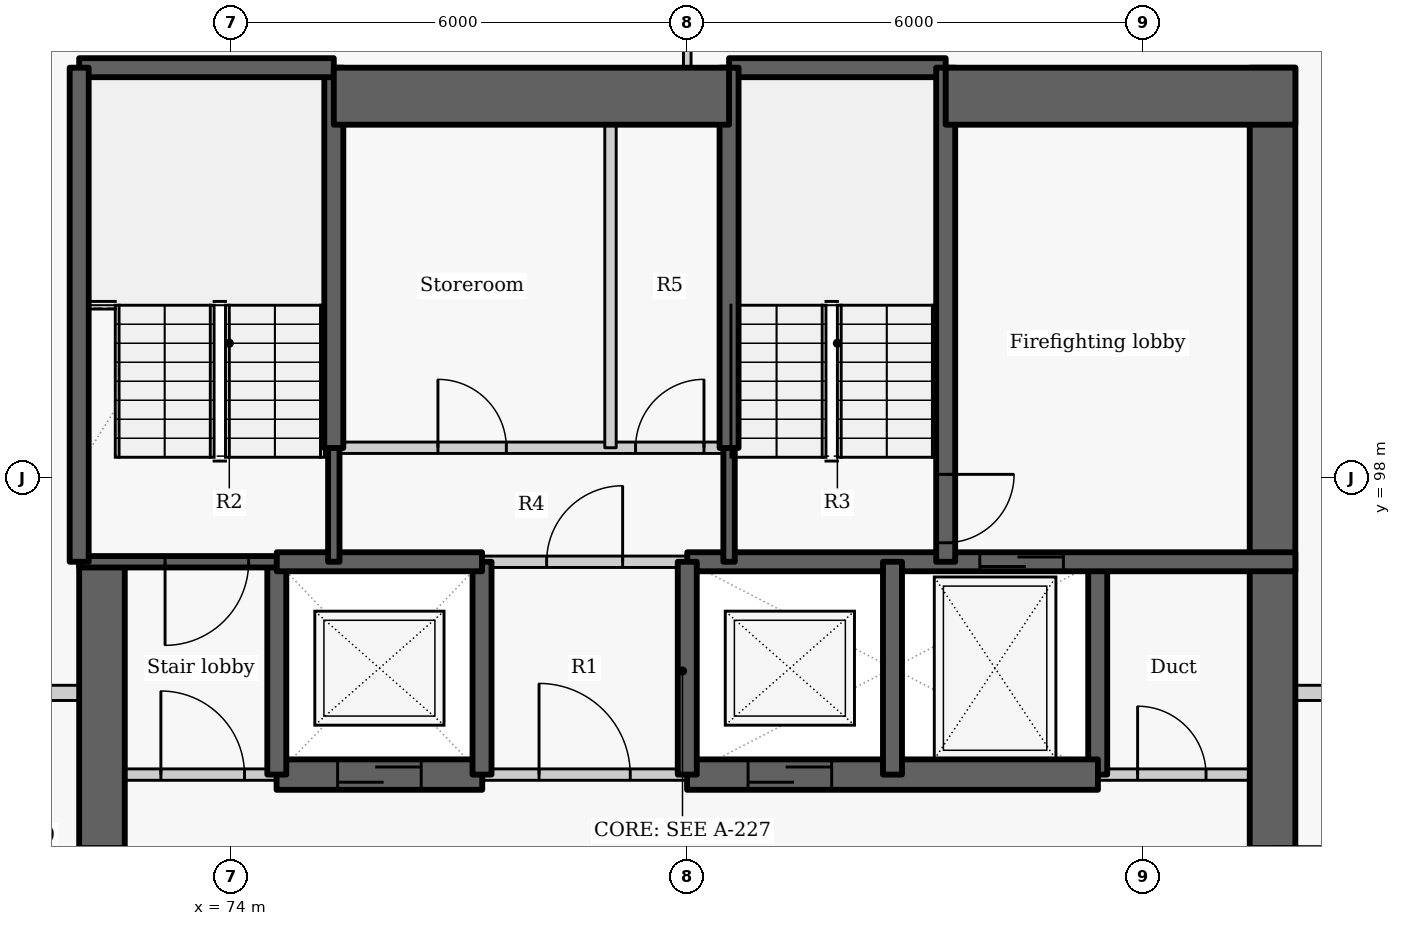
"""IFC4 building model, lengths in metres.
Left out: names, types, materials, properties, quantities, classifications, styles, units other than length and angle.
Written with IfcOpenShell. Run it as: python <this file> out.ifc"""

import sys

from ifc_helpers import new_model, si_unit, direction, frame, frame_2d, origin, place, context, subcontext, project, spatial, rectangle, extrude, element, fill, save


model = new_model("IFC4")
c1 = context("Model", 3, precision=1e-05, world=origin(), true_north=direction((0.0, 1.0)))
c2 = subcontext(c1, "Body", "Model", "MODEL_VIEW")
j1 = project(units=[si_unit("LENGTHUNIT", "METRE"), si_unit("PLANEANGLEUNIT", "RADIAN")], contexts=[c1])
p1 = place(None, origin())
s1 = spatial("IfcSite", under=j1, at=p1, CompositionType="ELEMENT")
p2 = place(p1, origin())
s2 = spatial("IfcBuilding", under=s1, at=p2, CompositionType="ELEMENT")
p3 = place(p2, frame((0.0, 0.0, 150.3)))
s3 = spatial("IfcBuildingStorey", under=s2, at=p3, CompositionType="ELEMENT", Elevation=150.3)
p4 = place(p3, frame((72.3, 87.8, -0.275), z_axis=(0.0, 0.0, 1.0), x_axis=(0.0, 1.0, 0.0)))
e1 = element("IfcWall", 1, at=p4, inside=s3, PredefinedType="SHEAR", context=c2, shape_type="SweptSolid", body=[
    extrude(rectangle(XDim=9.1, YDim=0.6, at=frame_2d((4.55, 0.0))), origin(), (0.0, 0.0, 1.0), 3.3),
])
p5 = place(p4, frame((3.852, 0.0, 0.275)))
e2 = element("IfcOpeningElement", 2, at=p5, cuts=e1, PredefinedType="OPENING", context=c2, shape_type="SweptSolid", body=[
    extrude(rectangle(XDim=1.5, YDim=2.1, at=frame_2d((0.75, 1.05))), frame((0.0, 0.31, 0.0), z_axis=(0.0, -1.0, 0.0), x_axis=(1.0, 0.0, 0.0)), (0.0, 0.0, 1.0), 0.62),
])
p6 = place(p3, frame((85.4, 94.1, -0.275), z_axis=(0.0, 0.0, 1.0), x_axis=(0.0, 1.0, 0.0)))
e3 = element("IfcWall", 3, at=p6, inside=s3, PredefinedType="SHEAR", context=c2, shape_type="SweptSolid", body=[
    extrude(rectangle(XDim=2.8, YDim=0.25, at=frame_2d((1.4, 0.0))), origin(), (0.0, 0.0, 1.0), 3.3),
])
p7 = place(p3, frame((87.7, 103.4, -0.275), z_axis=(0.0, 0.0, 1.0), x_axis=(0.0, -1.0, 0.0)))
e4 = element("IfcWall", 4, at=p7, inside=s3, PredefinedType="SHEAR", context=c2, shape_type="SweptSolid", body=[
    extrude(rectangle(XDim=15.6, YDim=0.6, at=frame_2d((7.8, 0.0))), origin(), (0.0, 0.0, 1.0), 3.3),
])
p8 = place(p7, frame((10.248, 0.0, 0.275)))
e5 = element("IfcOpeningElement", 5, at=p8, cuts=e4, PredefinedType="OPENING", context=c2, shape_type="SweptSolid", body=[
    extrude(rectangle(XDim=1.5, YDim=2.1, at=frame_2d((0.75, 1.05))), frame((0.0, 0.31, 0.0), z_axis=(0.0, -1.0, 0.0), x_axis=(1.0, 0.0, 0.0)), (0.0, 0.0, 1.0), 0.62),
])
p9 = place(p3, frame((72.0, 94.1, 0.0), z_axis=(0.0, 0.0, 1.0), x_axis=(1.0, 0.0, 0.0)))
e6 = element("IfcWall", 6, at=p9, inside=s3, PredefinedType="PARTITIONING", context=c2, shape_type="SweptSolid", body=[
    extrude(rectangle(XDim=2.603, YDim=0.15, at=frame_2d((1.302, 0.0))), origin(), (0.0, 0.0, 1.0), 3.025),
])
p10 = place(p9, frame((1.075, 0.0, 0.0)))
e7 = element("IfcOpeningElement", 7, at=p10, cuts=e6, PredefinedType="OPENING", context=c2, shape_type="SweptSolid", body=[
    extrude(rectangle(XDim=1.1, YDim=2.1, at=frame_2d((0.55, 1.05))), frame((0.0, 0.085, 0.0), z_axis=(0.0, -1.0, 0.0), x_axis=(1.0, 0.0, 0.0)), (0.0, 0.0, 1.0), 0.17),
])
p11 = place(p3, frame((77.297, 94.1, 0.0), z_axis=(0.0, 0.0, 1.0), x_axis=(1.0, 0.0, 0.0)))
e8 = element("IfcWall", 8, at=p11, inside=s3, PredefinedType="PARTITIONING", context=c2, shape_type="SweptSolid", body=[
    extrude(rectangle(XDim=2.706, YDim=0.15, at=frame_2d((1.353, 0.0))), origin(), (0.0, 0.0, 1.0), 3.025),
])
p12 = place(p11, frame((0.753, 0.0, 0.0)))
e9 = element("IfcOpeningElement", 9, at=p12, cuts=e8, PredefinedType="OPENING", context=c2, shape_type="SweptSolid", body=[
    extrude(rectangle(XDim=1.2, YDim=2.1, at=frame_2d((0.6, 1.05))), frame((0.0, 0.085, 0.0), z_axis=(0.0, -1.0, 0.0), x_axis=(1.0, 0.0, 0.0)), (0.0, 0.0, 1.0), 0.17),
])
p13 = place(p3, frame((85.397, 94.1, 0.0), z_axis=(0.0, 0.0, 1.0), x_axis=(1.0, 0.0, 0.0)))
e10 = element("IfcWall", 10, at=p13, inside=s3, PredefinedType="PARTITIONING", context=c2, shape_type="SweptSolid", body=[
    extrude(rectangle(XDim=2.603, YDim=0.15, at=frame_2d((1.302, 0.0))), origin(), (0.0, 0.0, 1.0), 3.025),
])
p14 = place(p13, frame((0.528, 0.0, 0.0)))
e11 = element("IfcOpeningElement", 11, at=p14, cuts=e10, PredefinedType="OPENING", context=c2, shape_type="SweptSolid", body=[
    extrude(rectangle(XDim=0.9, YDim=2.1, at=frame_2d((0.45, 1.05))), frame((0.0, 0.085, 0.0), z_axis=(0.0, -1.0, 0.0), x_axis=(1.0, 0.0, 0.0)), (0.0, 0.0, 1.0), 0.17),
])
p15 = place(p3, frame((74.597, 94.1, -0.275), z_axis=(0.0, 0.0, 1.0), x_axis=(1.0, 0.0, 0.0)))
e12 = element("IfcWall", 12, at=p15, inside=s3, PredefinedType="SHEAR", context=c2, shape_type="SweptSolid", body=[
    extrude(rectangle(XDim=2.706, YDim=0.4, at=frame_2d((1.353, 0.0))), origin(), (0.0, 0.0, 1.0), 3.3),
])
p16 = place(p15, frame((0.803, 0.0, 0.275)))
e13 = element("IfcOpeningElement", 13, at=p16, cuts=e12, PredefinedType="OPENING", context=c2, shape_type="SweptSolid", body=[
    extrude(rectangle(XDim=1.1, YDim=2.1, at=frame_2d((0.55, 1.05))), frame((0.0, 0.21, 0.0), z_axis=(0.0, -1.0, 0.0), x_axis=(1.0, 0.0, 0.0)), (0.0, 0.0, 1.0), 0.42),
])
p17 = place(p3, frame((79.997, 94.1, -0.275), z_axis=(0.0, 0.0, 1.0), x_axis=(1.0, 0.0, 0.0)))
e14 = element("IfcWall", 14, at=p17, inside=s3, PredefinedType="SHEAR", context=c2, shape_type="SweptSolid", body=[
    extrude(rectangle(XDim=5.406, YDim=0.4, at=frame_2d((2.703, 0.0))), origin(), (0.0, 0.0, 1.0), 3.3),
])
p18 = place(p17, frame((0.803, 0.0, 0.275)))
e15 = element("IfcOpeningElement", 15, at=p18, cuts=e14, PredefinedType="OPENING", context=c2, shape_type="SweptSolid", body=[
    extrude(rectangle(XDim=1.1, YDim=2.1, at=frame_2d((0.55, 1.05))), frame((0.0, 0.21, 0.0), z_axis=(0.0, -1.0, 0.0), x_axis=(1.0, 0.0, 0.0)), (0.0, 0.0, 1.0), 0.42),
])
p19 = place(p3, frame((74.6, 94.1, -0.275), z_axis=(0.0, 0.0, 1.0), x_axis=(0.0, 1.0, 0.0)))
e16 = element("IfcWall", 16, at=p19, inside=s3, PredefinedType="SHEAR", context=c2, shape_type="SweptSolid", body=[
    extrude(rectangle(XDim=2.8, YDim=0.25, at=frame_2d((1.4, 0.0))), origin(), (0.0, 0.0, 1.0), 3.3),
])
p20 = place(p3, frame((74.6, 96.9, -0.275), z_axis=(0.0, 0.0, 1.0), x_axis=(-1.0, 0.0, 0.0)))
e17 = element("IfcWall", 17, at=p20, inside=s3, PredefinedType="SHEAR", context=c2, shape_type="SweptSolid", body=[
    extrude(rectangle(XDim=2.6, YDim=0.15, at=frame_2d((1.3, 0.0))), origin(), (0.0, 0.0, 1.0), 3.3),
])
p21 = place(p20, frame((0.37, 0.0, 0.275)))
e18 = element("IfcOpeningElement", 18, at=p21, cuts=e17, PredefinedType="OPENING", context=c2, shape_type="SweptSolid", body=[
    extrude(rectangle(XDim=1.1, YDim=2.1, at=frame_2d((0.55, 1.05))), frame((0.0, 0.085, 0.0), z_axis=(0.0, -1.0, 0.0), x_axis=(1.0, 0.0, 0.0)), (0.0, 0.0, 1.0), 0.17),
])
p22 = place(p3, frame((77.3, 94.1, -0.275), z_axis=(0.0, 0.0, 1.0), x_axis=(0.0, 1.0, 0.0)))
e19 = element("IfcWall", 19, at=p22, inside=s3, PredefinedType="SHEAR", context=c2, shape_type="SweptSolid", body=[
    extrude(rectangle(XDim=2.8, YDim=0.25, at=frame_2d((1.4, 0.0))), origin(), (0.0, 0.0, 1.0), 3.3),
])
p23 = place(p3, frame((74.6, 96.9, -0.275), z_axis=(0.0, 0.0, 1.0), x_axis=(1.0, 0.0, 0.0)))
e20 = element("IfcWall", 20, at=p23, inside=s3, PredefinedType="SHEAR", context=c2, shape_type="SweptSolid", body=[
    extrude(rectangle(XDim=2.7, YDim=0.25, at=frame_2d((1.35, 0.0))), origin(), (0.0, 0.0, 1.0), 3.3),
])
p24 = place(p3, frame((80.0, 96.9, -0.275), z_axis=(0.0, 0.0, 1.0), x_axis=(1.0, 0.0, 0.0)))
e21 = element("IfcWall", 21, at=p24, inside=s3, PredefinedType="SHEAR", context=c2, shape_type="SweptSolid", body=[
    extrude(rectangle(XDim=8.0, YDim=0.25, at=frame_2d((4.0, 0.0))), origin(), (0.0, 0.0, 1.0), 3.3),
])
p25 = place(p24, frame((3.849, 0.0, 0.275)))
e22 = element("IfcOpeningElement", 22, at=p25, cuts=e21, PredefinedType="OPENING", context=c2, shape_type="SweptSolid", body=[
    extrude(rectangle(XDim=1.1, YDim=2.1, at=frame_2d((0.55, 1.05))), frame((0.0, 0.135, 0.0), z_axis=(0.0, -1.0, 0.0), x_axis=(1.0, 0.0, 0.0)), (0.0, 0.0, 1.0), 0.27),
])
p26 = place(p3, frame((80.0, 94.1, -0.275), z_axis=(0.0, 0.0, 1.0), x_axis=(0.0, 1.0, 0.0)))
e23 = element("IfcWall", 23, at=p26, inside=s3, PredefinedType="SHEAR", context=c2, shape_type="SweptSolid", body=[
    extrude(rectangle(XDim=2.8, YDim=0.25, at=frame_2d((1.4, 0.0))), origin(), (0.0, 0.0, 1.0), 3.3),
])
p27 = place(p3, frame((77.3, 96.9, 0.0), z_axis=(0.0, 0.0, 1.0), x_axis=(1.0, 0.0, 0.0)))
e24 = element("IfcWall", 24, at=p27, inside=s3, PredefinedType="PARTITIONING", context=c2, shape_type="SweptSolid", body=[
    extrude(rectangle(XDim=2.7, YDim=0.15, at=frame_2d((1.35, 0.0))), origin(), (0.0, 0.0, 1.0), 3.025),
])
p28 = place(p27, frame((0.85, 0.0, 0.0)))
e25 = element("IfcOpeningElement", 25, at=p28, cuts=e24, PredefinedType="OPENING", context=c2, shape_type="SweptSolid", body=[
    extrude(rectangle(XDim=1.0, YDim=2.1, at=frame_2d((0.5, 1.05))), frame((0.0, 0.085, 0.0), z_axis=(0.0, -1.0, 0.0), x_axis=(1.0, 0.0, 0.0)), (0.0, 0.0, 1.0), 0.17),
])
p29 = place(p3, frame((82.7, 94.1, -0.275), z_axis=(0.0, 0.0, 1.0), x_axis=(0.0, 1.0, 0.0)))
e26 = element("IfcWall", 26, at=p29, inside=s3, PredefinedType="SHEAR", context=c2, shape_type="SweptSolid", body=[
    extrude(rectangle(XDim=2.8, YDim=0.25, at=frame_2d((1.4, 0.0))), origin(), (0.0, 0.0, 1.0), 3.3),
])
p30 = place(p3, frame((75.35, 96.9, -0.275), z_axis=(0.0, 0.0, 1.0), x_axis=(0.0, 1.0, 0.0)))
e27 = element("IfcWall", 27, at=p30, inside=s3, PredefinedType="SHEAR", context=c2, shape_type="SweptSolid", body=[
    extrude(rectangle(XDim=1.503, YDim=0.15, at=frame_2d((0.751, 0.0))), origin(), (0.0, 0.0, 1.0), 3.3),
])
p31 = place(p3, frame((75.35, 98.397, -0.275), z_axis=(0.0, 0.0, 1.0), x_axis=(0.0, 1.0, 0.0)))
e28 = element("IfcWall", 28, at=p31, inside=s3, PredefinedType="SHEAR", context=c2, shape_type="SweptSolid", body=[
    extrude(rectangle(XDim=5.003, YDim=0.25, at=frame_2d((2.501, 0.0))), origin(), (0.0, 0.0, 1.0), 3.3),
])
p32 = place(p3, frame((72.0, 103.4, -0.275), z_axis=(0.0, 0.0, 1.0), x_axis=(1.0, 0.0, 0.0)))
e29 = element("IfcWall", 29, at=p32, inside=s3, PredefinedType="SHEAR", context=c2, shape_type="SweptSolid", body=[
    extrude(rectangle(XDim=3.35, YDim=0.25, at=frame_2d((1.675, 0.0))), origin(), (0.0, 0.0, 1.0), 3.3),
])
p33 = place(p3, frame((80.55, 103.4, -0.275), z_axis=(0.0, 0.0, 1.0), x_axis=(1.0, 0.0, 0.0)))
e30 = element("IfcWall", 30, at=p33, inside=s3, PredefinedType="SHEAR", context=c2, shape_type="SweptSolid", body=[
    extrude(rectangle(XDim=2.85, YDim=0.25, at=frame_2d((1.425, 0.0))), origin(), (0.0, 0.0, 1.0), 3.3),
])
p34 = place(p3, frame((72.0, 96.9, -0.275), z_axis=(0.0, 0.0, 1.0), x_axis=(0.0, 1.0, 0.0)))
e31 = element("IfcWall", 31, at=p34, inside=s3, PredefinedType="SHEAR", context=c2, shape_type="SweptSolid", body=[
    extrude(rectangle(XDim=6.5, YDim=0.25, at=frame_2d((3.25, 0.0))), origin(), (0.0, 0.0, 1.0), 3.3),
])
p35 = place(p3, frame((83.4, 103.4, -0.275), z_axis=(0.0, 0.0, 1.0), x_axis=(0.0, -1.0, 0.0)))
e32 = element("IfcWall", 32, at=p35, inside=s3, PredefinedType="SHEAR", context=c2, shape_type="SweptSolid", body=[
    extrude(rectangle(XDim=6.5, YDim=0.25, at=frame_2d((3.25, 0.0))), origin(), (0.0, 0.0, 1.0), 3.3),
])
p36 = place(p35, frame((5.35, 0.0, 0.275)))
e33 = element("IfcOpeningElement", 33, at=p36, cuts=e32, PredefinedType="OPENING", context=c2, shape_type="SweptSolid", body=[
    extrude(rectangle(XDim=0.9, YDim=2.1, at=frame_2d((0.45, 1.05))), frame((0.0, 0.135, 0.0), z_axis=(0.0, -1.0, 0.0), x_axis=(1.0, 0.0, 0.0)), (0.0, 0.0, 1.0), 0.27),
])
p37 = place(p3, frame((80.55, 96.9, -0.275), z_axis=(0.0, 0.0, 1.0), x_axis=(0.0, 1.0, 0.0)))
e34 = element("IfcWall", 34, at=p37, inside=s3, PredefinedType="SHEAR", context=c2, shape_type="SweptSolid", body=[
    extrude(rectangle(XDim=1.503, YDim=0.15, at=frame_2d((0.751, 0.0))), origin(), (0.0, 0.0, 1.0), 3.3),
])
p38 = place(p3, frame((80.55, 98.397, -0.275), z_axis=(0.0, 0.0, 1.0), x_axis=(0.0, 1.0, 0.0)))
e35 = element("IfcWall", 35, at=p38, inside=s3, PredefinedType="SHEAR", context=c2, shape_type="SweptSolid", body=[
    extrude(rectangle(XDim=5.003, YDim=0.25, at=frame_2d((2.501, 0.0))), origin(), (0.0, 0.0, 1.0), 3.3),
])
p39 = place(p3, frame((75.35, 103.025, -0.275), z_axis=(0.0, 0.0, 1.0), x_axis=(1.0, 0.0, 0.0)))
e36 = element("IfcWall", 36, at=p39, inside=s3, PredefinedType="SHEAR", context=c2, shape_type="SweptSolid", body=[
    extrude(rectangle(XDim=5.2, YDim=0.75, at=frame_2d((2.6, 0.0))), origin(), (0.0, 0.0, 1.0), 3.3),
])
p40 = place(p3, frame((83.4, 103.025, -0.275), z_axis=(0.0, 0.0, 1.0), x_axis=(1.0, 0.0, 0.0)))
e37 = element("IfcWall", 37, at=p40, inside=s3, PredefinedType="SHEAR", context=c2, shape_type="SweptSolid", body=[
    extrude(rectangle(XDim=4.6, YDim=0.75, at=frame_2d((2.3, 0.0))), origin(), (0.0, 0.0, 1.0), 3.3),
])
p41 = place(p3, frame((75.35, 98.4, 0.0), z_axis=(0.0, 0.0, 1.0), x_axis=(1.0, 0.0, 0.0)))
e38 = element("IfcWall", 38, at=p41, inside=s3, PredefinedType="PARTITIONING", context=c2, shape_type="SweptSolid", body=[
    extrude(rectangle(XDim=5.2, YDim=0.15, at=frame_2d((2.6, 0.0))), origin(), (0.0, 0.0, 1.0), 3.025),
])
p42 = place(p41, frame((1.37, 0.0, 0.0)))
e39 = element("IfcOpeningElement", 39, at=p42, cuts=e38, PredefinedType="OPENING", context=c2, shape_type="SweptSolid", body=[
    extrude(rectangle(XDim=0.9, YDim=2.1, at=frame_2d((0.45, 1.05))), frame((0.0, 0.085, 0.0), z_axis=(0.0, -1.0, 0.0), x_axis=(1.0, 0.0, 0.0)), (0.0, 0.0, 1.0), 0.17),
])
p43 = place(p41, frame((3.97, 0.0, 0.0)))
e40 = element("IfcOpeningElement", 40, at=p43, cuts=e38, PredefinedType="OPENING", context=c2, shape_type="SweptSolid", body=[
    extrude(rectangle(XDim=0.9, YDim=2.1, at=frame_2d((0.45, 1.05))), frame((0.0, 0.085, 0.0), z_axis=(0.0, -1.0, 0.0), x_axis=(1.0, 0.0, 0.0)), (0.0, 0.0, 1.0), 0.17),
])
p44 = place(p3, frame((78.99, 98.4, 0.0), z_axis=(0.0, 0.0, 1.0), x_axis=(0.0, 1.0, 0.0)))
e41 = element("IfcWall", 41, at=p44, inside=s3, PredefinedType="PARTITIONING", context=c2, shape_type="SweptSolid", body=[
    extrude(rectangle(XDim=5.0, YDim=0.15, at=frame_2d((2.5, 0.0))), origin(), (0.0, 0.0, 1.0), 3.025),
])
p45 = place(p3, frame((69.537, 95.175, 0.0), z_axis=(0.0, 0.0, 1.0), x_axis=(1.0, 0.0, 0.0)))
e42 = element("IfcWall", 42, at=p45, inside=s3, PredefinedType="PARTITIONING", context=c2, shape_type="SweptSolid", body=[
    extrude(rectangle(XDim=2.463, YDim=0.2, at=frame_2d((1.231, 0.0))), origin(), (0.0, 0.0, 1.0), 2.505),
])
p46 = place(p3, frame((88.0, 95.175, 0.0), z_axis=(0.0, 0.0, 1.0), x_axis=(1.0, 0.0, 0.0)))
e43 = element("IfcWall", 43, at=p46, inside=s3, PredefinedType="PARTITIONING", context=c2, shape_type="SweptSolid", body=[
    extrude(rectangle(XDim=1.423, YDim=0.2, at=frame_2d((0.711, 0.0))), origin(), (0.0, 0.0, 1.0), 3.025),
])
p47 = place(p3, frame((80.0, 103.4, 0.0), z_axis=(0.0, 0.0, 1.0), x_axis=(0.0, 1.0, 0.0)))
e44 = element("IfcWall", 44, at=p47, inside=s3, PredefinedType="PARTITIONING", context=c2, shape_type="SweptSolid", body=[
    extrude(rectangle(XDim=0.3, YDim=0.1, at=frame_2d((0.15, 0.0))), origin(), (0.0, 0.0, 1.0), 3.025),
])
p48 = place(p10, origin())
e45 = element("IfcDoor", 45, at=p48, inside=s3, OperationType="SINGLE_SWING_LEFT", PredefinedType="DOOR", context=c2, shape_type="SweptSolid", body=[
    extrude(rectangle(XDim=1.1, YDim=2.1, at=frame_2d((0.55, 1.05))), frame((0.0, 0.025, 0.0), z_axis=(0.0, -1.0, 0.0), x_axis=(1.0, 0.0, 0.0)), (0.0, 0.0, 1.0), 0.05),
])
fill(e7, e45)
p49 = place(p16, origin())
e46 = element("IfcDoor", 46, at=p49, inside=s3, OperationType="SLIDING_TO_LEFT", PredefinedType="DOOR", context=c2, shape_type="SweptSolid", body=[
    extrude(rectangle(XDim=1.1, YDim=2.1, at=frame_2d((0.55, 1.05))), frame((0.0, 0.025, 0.0), z_axis=(0.0, -1.0, 0.0), x_axis=(1.0, 0.0, 0.0)), (0.0, 0.0, 1.0), 0.05),
])
fill(e13, e46)
p50 = place(p12, origin())
e47 = element("IfcDoor", 47, at=p50, inside=s3, OperationType="DOUBLE_DOOR_SINGLE_SWING", PredefinedType="DOOR", context=c2, shape_type="SweptSolid", body=[
    extrude(rectangle(XDim=1.2, YDim=2.1, at=frame_2d((0.6, 1.05))), frame((0.0, 0.025, 0.0), z_axis=(0.0, -1.0, 0.0), x_axis=(1.0, 0.0, 0.0)), (0.0, 0.0, 1.0), 0.05),
])
fill(e9, e47)
p51 = place(p18, origin())
e48 = element("IfcDoor", 48, at=p51, inside=s3, OperationType="SLIDING_TO_LEFT", PredefinedType="DOOR", context=c2, shape_type="SweptSolid", body=[
    extrude(rectangle(XDim=1.1, YDim=2.1, at=frame_2d((0.55, 1.05))), frame((0.0, 0.025, 0.0), z_axis=(0.0, -1.0, 0.0), x_axis=(1.0, 0.0, 0.0)), (0.0, 0.0, 1.0), 0.05),
])
fill(e15, e48)
p52 = place(p25, origin())
e49 = element("IfcDoor", 49, at=p52, inside=s3, OperationType="SLIDING_TO_LEFT", PredefinedType="DOOR", context=c2, shape_type="SweptSolid", body=[
    extrude(rectangle(XDim=1.1, YDim=2.1, at=frame_2d((0.55, 1.05))), frame((0.0, 0.025, 0.0), z_axis=(0.0, -1.0, 0.0), x_axis=(1.0, 0.0, 0.0)), (0.0, 0.0, 1.0), 0.05),
])
fill(e22, e49)
p53 = place(p14, origin())
e50 = element("IfcDoor", 50, at=p53, inside=s3, OperationType="SINGLE_SWING_LEFT", PredefinedType="DOOR", context=c2, shape_type="SweptSolid", body=[
    extrude(rectangle(XDim=0.9, YDim=2.1, at=frame_2d((0.45, 1.05))), frame((0.0, 0.025, 0.0), z_axis=(0.0, -1.0, 0.0), x_axis=(1.0, 0.0, 0.0)), (0.0, 0.0, 1.0), 0.05),
])
fill(e11, e50)
p54 = place(p28, origin())
e51 = element("IfcDoor", 51, at=p54, inside=s3, OperationType="SINGLE_SWING_RIGHT", PredefinedType="DOOR", context=c2, shape_type="SweptSolid", body=[
    extrude(rectangle(XDim=1.0, YDim=2.1, at=frame_2d((0.5, 1.05))), frame((0.0, 0.025, 0.0), z_axis=(0.0, -1.0, 0.0), x_axis=(1.0, 0.0, 0.0)), (0.0, 0.0, 1.0), 0.05),
])
fill(e25, e51)
p55 = place(p42, origin())
e52 = element("IfcDoor", 52, at=p55, inside=s3, OperationType="SINGLE_SWING_LEFT", PredefinedType="DOOR", context=c2, shape_type="SweptSolid", body=[
    extrude(rectangle(XDim=0.9, YDim=2.1, at=frame_2d((0.45, 1.05))), frame((0.0, 0.025, 0.0), z_axis=(0.0, -1.0, 0.0), x_axis=(1.0, 0.0, 0.0)), (0.0, 0.0, 1.0), 0.05),
])
fill(e39, e52)
p56 = place(p43, origin())
e53 = element("IfcDoor", 53, at=p56, inside=s3, OperationType="SINGLE_SWING_RIGHT", PredefinedType="DOOR", context=c2, shape_type="SweptSolid", body=[
    extrude(rectangle(XDim=0.9, YDim=2.1, at=frame_2d((0.45, 1.05))), frame((0.0, 0.025, 0.0), z_axis=(0.0, -1.0, 0.0), x_axis=(1.0, 0.0, 0.0)), (0.0, 0.0, 1.0), 0.05),
])
fill(e40, e53)
p57 = place(p21, origin())
e54 = element("IfcDoor", 54, at=p57, inside=s3, OperationType="SINGLE_SWING_RIGHT", PredefinedType="DOOR", context=c2, shape_type="SweptSolid", body=[
    extrude(rectangle(XDim=1.1, YDim=2.1, at=frame_2d((0.55, 1.05))), frame((0.0, 0.025, 0.0), z_axis=(0.0, -1.0, 0.0), x_axis=(1.0, 0.0, 0.0)), (0.0, 0.0, 1.0), 0.05),
])
fill(e18, e54)
p58 = place(p36, origin())
e55 = element("IfcDoor", 55, at=p58, inside=s3, OperationType="SINGLE_SWING_LEFT", PredefinedType="DOOR", context=c2, shape_type="SweptSolid", body=[
    extrude(rectangle(XDim=0.9, YDim=2.1, at=frame_2d((0.45, 1.05))), frame((0.0, 0.025, 0.0), z_axis=(0.0, -1.0, 0.0), x_axis=(1.0, 0.0, 0.0)), (0.0, 0.0, 1.0), 0.05),
])
fill(e33, e55)
p59 = place(p8, origin())
e56 = element("IfcDoor", 56, at=p59, inside=s3, OperationType="DOUBLE_DOOR_SINGLE_SWING", PredefinedType="DOOR", context=c2, shape_type="SweptSolid", body=[
    extrude(rectangle(XDim=1.5, YDim=2.1, at=frame_2d((0.75, 1.05))), frame((0.0, 0.025, 0.0), z_axis=(0.0, -1.0, 0.0), x_axis=(1.0, 0.0, 0.0)), (0.0, 0.0, 1.0), 0.05),
])
fill(e5, e56)
p60 = place(p5, origin())
e57 = element("IfcDoor", 57, at=p60, inside=s3, OperationType="DOUBLE_DOOR_SINGLE_SWING", PredefinedType="DOOR", context=c2, shape_type="SweptSolid", body=[
    extrude(rectangle(XDim=1.5, YDim=2.1, at=frame_2d((0.75, 1.05))), frame((0.0, 0.025, 0.0), z_axis=(0.0, -1.0, 0.0), x_axis=(1.0, 0.0, 0.0)), (0.0, 0.0, 1.0), 0.05),
])
fill(e2, e57)
save(model, sys.argv[1])
